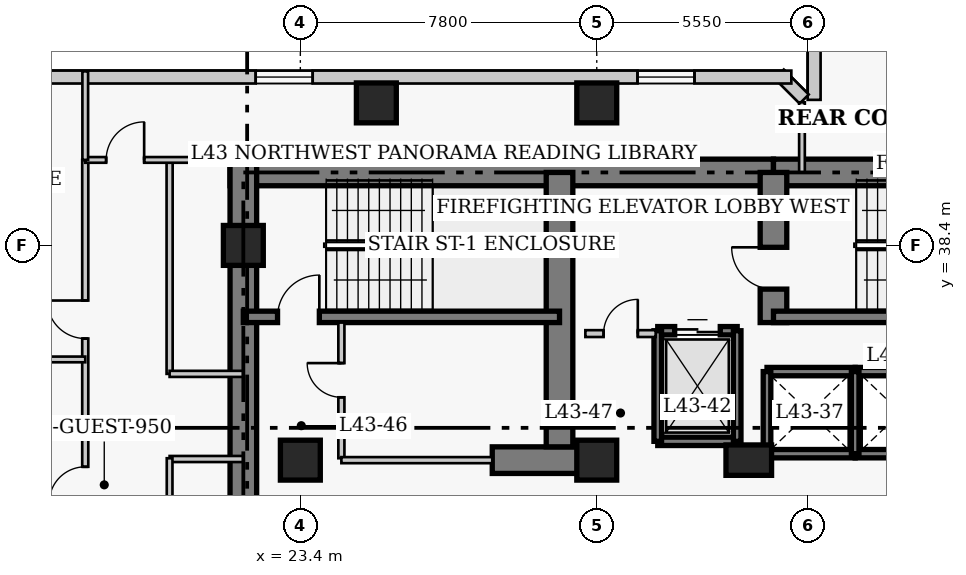
"""IFC4 building model, lengths in metres.
Left out: names, types, materials, properties, quantities, classifications, styles, units other than length and angle.
Written with IfcOpenShell. Run it as: python <this file> out.ifc"""

import sys

from ifc_helpers import new_model, si_unit, direction, frame, frame_2d, origin, origin_2d, place, context, subcontext, project, spatial, rectangle, extrude, element, fill, save


model = new_model("IFC4")
c1 = context("Model", 3, precision=1e-05, world=origin(), true_north=direction((0.0, 1.0)))
c2 = subcontext(c1, "Body", "Model", "MODEL_VIEW")
j1 = project(units=[si_unit("LENGTHUNIT", "METRE"), si_unit("PLANEANGLEUNIT", "RADIAN")], contexts=[c1])
p1 = place(None, origin())
s1 = spatial("IfcSite", under=j1, at=p1, CompositionType="ELEMENT")
p2 = place(p1, origin())
s2 = spatial("IfcBuilding", under=s1, at=p2, CompositionType="ELEMENT")
p3 = place(p2, frame((0.0, 0.0, 172.6)))
s3 = spatial("IfcBuildingStorey", under=s2, at=p3, CompositionType="ELEMENT", Elevation=172.6)
p4 = place(p3, frame((21.55, 40.32, 0.0), z_axis=(0.0, 0.0, 1.0), x_axis=(1.0, 0.0, 0.0)))
e1 = element("IfcWall", 1, at=p4, inside=s3, PredefinedType="SHEAR", context=c2, shape_type="SweptSolid", body=[
    extrude(rectangle(XDim=14.3, YDim=0.7, at=frame_2d((7.15, 0.0))), origin(), (0.0, 0.0, 1.0), 3.8),
])
p5 = place(p3, frame((35.85, 40.32, 0.0), z_axis=(0.0, 0.0, 1.0), x_axis=(1.0, 0.0, 0.0)))
e2 = element("IfcWall", 2, at=p5, inside=s3, PredefinedType="SHEAR", context=c2, shape_type="SweptSolid", body=[
    extrude(rectangle(XDim=12.6, YDim=0.7, at=frame_2d((6.3, 0.0))), origin(), (0.0, 0.0, 1.0), 3.8),
])
p6 = place(p3, frame((21.9, 27.05, 0.0), z_axis=(0.0, 0.0, 1.0), x_axis=(0.0, 1.0, 0.0)))
e3 = element("IfcWall", 3, at=p6, inside=s3, PredefinedType="SHEAR", context=c2, shape_type="SweptSolid", body=[
    extrude(rectangle(XDim=13.62, YDim=0.7, at=frame_2d((6.81, 0.0))), origin(), (0.0, 0.0, 1.0), 3.8),
])
p7 = place(p3, frame((28.45, 32.75, 0.0), z_axis=(0.0, 0.0, 1.0), x_axis=(1.0, 0.0, 0.0)))
e4 = element("IfcWall", 4, at=p7, inside=s3, PredefinedType="SHEAR", context=c2, shape_type="SweptSolid", body=[
    extrude(rectangle(XDim=2.4, YDim=0.7, at=frame_2d((1.2, 0.0))), origin(), (0.0, 0.0, 1.0), 3.8),
])
p8 = place(p3, frame((30.22, 33.1, 0.0), z_axis=(0.0, 0.0, 1.0), x_axis=(0.0, 1.0, 0.0)))
e5 = element("IfcWall", 5, at=p8, inside=s3, PredefinedType="SHEAR", context=c2, shape_type="SweptSolid", body=[
    extrude(rectangle(XDim=7.22, YDim=0.7, at=frame_2d((3.61, 0.0))), origin(), (0.0, 0.0, 1.0), 3.8),
])
p9 = place(p3, frame((35.85, 36.37, 0.0), z_axis=(0.0, 0.0, 1.0), x_axis=(0.0, 1.0, 0.0)))
e6 = element("IfcWall", 6, at=p9, inside=s3, PredefinedType="SHEAR", context=c2, shape_type="SweptSolid", body=[
    extrude(rectangle(XDim=3.95, YDim=0.7, at=frame_2d((1.975, 0.0))), origin(), (0.0, 0.0, 1.0), 3.8),
])
p10 = place(p9, frame((0.88, 0.0, 0.0)))
e7 = element("IfcOpeningElement", 7, at=p10, cuts=e6, PredefinedType="OPENING", context=c2, shape_type="SweptSolid", body=[
    extrude(rectangle(XDim=1.1, YDim=2.15, at=frame_2d((0.55, 1.075))), frame((0.0, 0.36, 0.0), z_axis=(0.0, -1.0, 0.0), x_axis=(1.0, 0.0, 0.0)), (0.0, 0.0, 1.0), 0.72),
])
p11 = place(p3, frame((21.9, 36.52, 0.0), z_axis=(0.0, 0.0, 1.0), x_axis=(1.0, 0.0, 0.0)))
e8 = element("IfcWall", 8, at=p11, inside=s3, PredefinedType="SHEAR", context=c2, shape_type="SweptSolid", body=[
    extrude(rectangle(XDim=8.32, YDim=0.3, at=frame_2d((4.16, 0.0))), origin(), (0.0, 0.0, 1.0), 3.8),
])
p12 = place(p11, frame((0.9, 0.0, 0.0)))
e9 = element("IfcOpeningElement", 9, at=p12, cuts=e8, PredefinedType="OPENING", context=c2, shape_type="SweptSolid", body=[
    extrude(rectangle(XDim=1.1, YDim=2.15, at=frame_2d((0.55, 1.075))), frame((0.0, 0.16, 0.0), z_axis=(0.0, -1.0, 0.0), x_axis=(1.0, 0.0, 0.0)), (0.0, 0.0, 1.0), 0.32),
])
p13 = place(p3, frame((35.85, 36.52, 0.0), z_axis=(0.0, 0.0, 1.0), x_axis=(1.0, 0.0, 0.0)))
e10 = element("IfcWall", 10, at=p13, inside=s3, PredefinedType="SHEAR", context=c2, shape_type="SweptSolid", body=[
    extrude(rectangle(XDim=8.33, YDim=0.3, at=frame_2d((4.165, 0.0))), origin(), (0.0, 0.0, 1.0), 3.8),
])
for number, where, z_axis, x_axis in (
    (11, (21.9, 38.4, 0.0), (0.0, 0.0, 1.0), (1.0, 0.0, 0.0)),
    (12, (23.4, 32.75, 0.0), (0.0, 0.0, 1.0), (1.0, 0.0, 0.0)),
    (13, (31.2, 32.75, 0.0), (0.0, 0.0, 1.0), (1.0, 0.0, 0.0)),
):
    element("IfcColumn", number, at=place(p3, frame(where, z_axis=z_axis, x_axis=x_axis)), inside=s3, PredefinedType="COLUMN", context=c2, shape_type="SweptSolid", body=[
        extrude(rectangle(XDim=1.05, YDim=1.05, at=origin_2d()), origin(), (0.0, 0.0, 1.0), 3.8),
    ])
p14 = place(p3, frame((35.2, 32.75, 0.0), z_axis=(0.0, 0.0, 1.0), x_axis=(1.0, 0.0, 0.0)))
e14 = element("IfcColumn", 14, at=p14, inside=s3, PredefinedType="COLUMN", context=c2, shape_type="SweptSolid", body=[
    extrude(rectangle(XDim=1.2, YDim=0.8, at=origin_2d()), origin(), (0.0, 0.0, 1.0), 3.8),
])
for number, where, z_axis, x_axis in (
    (15, (25.4, 42.15, 0.0), (0.0, 0.0, 1.0), (1.0, 0.0, 0.0)),
    (16, (31.2, 42.15, 0.0), (0.0, 0.0, 1.0), (1.0, 0.0, 0.0)),
):
    element("IfcColumn", number, at=place(p3, frame(where, z_axis=z_axis, x_axis=x_axis)), inside=s3, PredefinedType="COLUMN", context=c2, shape_type="SweptSolid", body=[
        extrude(rectangle(XDim=1.05, YDim=1.05, at=origin_2d()), origin(), (0.0, 0.0, 1.0), 3.8),
    ])
p15 = place(p3, frame((36.92, 44.37, 0.0), z_axis=(0.0, 0.0, 1.0), x_axis=(0.0, -1.0, 0.0)))
e17 = element("IfcWall", 17, at=p15, inside=s3, PredefinedType="SOLIDWALL", context=c2, shape_type="SweptSolid", body=[
    extrude(rectangle(XDim=2.14, YDim=0.34, at=frame_2d((1.07, 0.0))), origin(), (0.0, 0.0, 1.0), 3.55),
])
p16 = place(p3, frame((36.658, 42.251, 0.0), z_axis=(0.0, 0.0, 1.0), x_axis=(-0.707106781187, 0.707106781187, 0.0)))
e18 = element("IfcWall", 18, at=p16, inside=s3, PredefinedType="SOLIDWALL", context=c2, shape_type="SweptSolid", body=[
    extrude(rectangle(XDim=0.929, YDim=0.34, at=frame_2d((0.464, 0.0))), origin(), (0.0, 0.0, 1.0), 3.55),
])
p17 = place(p3, frame((36.32, 42.83, 0.0), z_axis=(0.0, 0.0, 1.0), x_axis=(-1.0, 0.0, 0.0)))
e19 = element("IfcWall", 19, at=p17, inside=s3, PredefinedType="SOLIDWALL", context=c2, shape_type="SweptSolid", body=[
    extrude(rectangle(XDim=26.69, YDim=0.34, at=frame_2d((13.345, 0.0))), origin(), (0.0, 0.0, 1.0), 3.55),
])
p18 = place(p17, frame((2.548, 0.0, 0.85)))
e20 = element("IfcOpeningElement", 20, at=p18, cuts=e19, PredefinedType="OPENING", context=c2, shape_type="SweptSolid", body=[
    extrude(rectangle(XDim=1.5, YDim=1.75, at=frame_2d((0.75, 0.875))), frame((0.0, 0.18, 0.0), z_axis=(0.0, -1.0, 0.0), x_axis=(1.0, 0.0, 0.0)), (0.0, 0.0, 1.0), 0.36),
])
p19 = place(p17, frame((12.595, 0.0, 0.85)))
e21 = element("IfcOpeningElement", 21, at=p19, cuts=e19, PredefinedType="OPENING", context=c2, shape_type="SweptSolid", body=[
    extrude(rectangle(XDim=1.5, YDim=1.75, at=frame_2d((0.75, 0.875))), frame((0.0, 0.18, 0.0), z_axis=(0.0, -1.0, 0.0), x_axis=(1.0, 0.0, 0.0)), (0.0, 0.0, 1.0), 0.36),
])
p20 = place(p17, frame((21.492, 0.0, 0.85)))
e22 = element("IfcOpeningElement", 22, at=p20, cuts=e19, PredefinedType="OPENING", context=c2, shape_type="SweptSolid", body=[
    extrude(rectangle(XDim=1.5, YDim=1.75, at=frame_2d((0.75, 0.875))), frame((0.0, 0.18, 0.0), z_axis=(0.0, -1.0, 0.0), x_axis=(1.0, 0.0, 0.0)), (0.0, 0.0, 1.0), 0.36),
])
for number, where, z_axis, x_axis in (
    (23, (35.68, 35.08, 0.0), (0.0, 0.0, 1.0), (1.0, 0.0, 0.0)),
    (24, (35.68, 32.92, 0.0), (0.0, 0.0, 1.0), (1.0, 0.0, 0.0)),
):
    element("IfcWall", number, at=place(p3, frame(where, z_axis=z_axis, x_axis=x_axis)), inside=s3, PredefinedType="SHEAR", context=c2, shape_type="SweptSolid", body=[
        extrude(rectangle(XDim=2.32, YDim=0.22, at=frame_2d((1.16, 0.0))), origin(), (0.0, 0.0, 1.0), 3.8),
    ])
p21 = place(p3, frame((35.68, 32.92, 0.0), z_axis=(0.0, 0.0, 1.0), x_axis=(0.0, 1.0, 0.0)))
e25 = element("IfcWall", 25, at=p21, inside=s3, PredefinedType="SHEAR", context=c2, shape_type="SweptSolid", body=[
    extrude(rectangle(XDim=2.16, YDim=0.2, at=frame_2d((1.08, 0.0))), origin(), (0.0, 0.0, 1.0), 3.8),
])
for number, where, z_axis, x_axis in (
    (26, (38.0, 35.08, 0.0), (0.0, 0.0, 1.0), (1.0, 0.0, 0.0)),
    (27, (38.0, 32.92, 0.0), (0.0, 0.0, 1.0), (1.0, 0.0, 0.0)),
):
    element("IfcWall", number, at=place(p3, frame(where, z_axis=z_axis, x_axis=x_axis)), inside=s3, PredefinedType="SHEAR", context=c2, shape_type="SweptSolid", body=[
        extrude(rectangle(XDim=2.4, YDim=0.22, at=frame_2d((1.2, 0.0))), origin(), (0.0, 0.0, 1.0), 3.8),
    ])
p22 = place(p3, frame((38.0, 32.92, 0.0), z_axis=(0.0, 0.0, 1.0), x_axis=(0.0, 1.0, 0.0)))
e28 = element("IfcWall", 28, at=p22, inside=s3, PredefinedType="SHEAR", context=c2, shape_type="SweptSolid", body=[
    extrude(rectangle(XDim=2.16, YDim=0.2, at=frame_2d((1.08, 0.0))), origin(), (0.0, 0.0, 1.0), 3.8),
])
p23 = place(p3, frame((32.805, 36.155, 0.0), z_axis=(0.0, 0.0, 1.0), x_axis=(1.0, 0.0, 0.0)))
e29 = element("IfcWall", 29, at=p23, inside=s3, PredefinedType="SHEAR", context=c2, shape_type="SweptSolid", body=[
    extrude(rectangle(XDim=2.09, YDim=0.22, at=frame_2d((1.045, 0.0))), origin(), (0.0, 0.0, 1.0), 3.8),
])
p24 = place(p23, frame((0.445, 0.0, 0.0)))
e30 = element("IfcOpeningElement", 30, at=p24, cuts=e29, PredefinedType="OPENING", context=c2, shape_type="SweptSolid", body=[
    extrude(rectangle(XDim=1.2, YDim=2.15, at=frame_2d((0.6, 1.075))), frame((0.0, 0.12, 0.0), z_axis=(0.0, -1.0, 0.0), x_axis=(1.0, 0.0, 0.0)), (0.0, 0.0, 1.0), 0.24),
])
p25 = place(p3, frame((32.805, 33.245, 0.0), z_axis=(0.0, 0.0, 1.0), x_axis=(1.0, 0.0, 0.0)))
e31 = element("IfcWall", 31, at=p25, inside=s3, PredefinedType="SHEAR", context=c2, shape_type="SweptSolid", body=[
    extrude(rectangle(XDim=2.09, YDim=0.22, at=frame_2d((1.045, 0.0))), origin(), (0.0, 0.0, 1.0), 3.8),
])
for number, where, z_axis, x_axis in (
    (32, (32.805, 33.245, 0.0), (0.0, 0.0, 1.0), (0.0, 1.0, 0.0)),
    (33, (34.895, 33.245, 0.0), (0.0, 0.0, 1.0), (0.0, 1.0, 0.0)),
):
    element("IfcWall", number, at=place(p3, frame(where, z_axis=z_axis, x_axis=x_axis)), inside=s3, PredefinedType="SHEAR", context=c2, shape_type="SweptSolid", body=[
        extrude(rectangle(XDim=2.91, YDim=0.2, at=frame_2d((1.455, 0.0))), origin(), (0.0, 0.0, 1.0), 3.8),
    ])
p26 = place(p3, frame((30.9, 36.08, 0.0), z_axis=(0.0, 0.0, 1.0), x_axis=(1.0, 0.0, 0.0)))
e34 = element("IfcWall", 34, at=p26, inside=s3, PredefinedType="PARTITIONING", context=c2, shape_type="SweptSolid", body=[
    extrude(rectangle(XDim=1.85, YDim=0.18, at=frame_2d((0.925, 0.0))), origin(), (0.0, 0.0, 1.0), 3.55),
])
p27 = place(p26, frame((0.48, 0.0, 0.0)))
e35 = element("IfcOpeningElement", 35, at=p27, cuts=e34, PredefinedType="OPENING", context=c2, shape_type="SweptSolid", body=[
    extrude(rectangle(XDim=0.9, YDim=2.15, at=frame_2d((0.45, 1.075))), frame((0.0, 0.1, 0.0), z_axis=(0.0, -1.0, 0.0), x_axis=(1.0, 0.0, 0.0)), (0.0, 0.0, 1.0), 0.2),
])
p28 = place(p3, frame((24.48, 32.8, 0.0), z_axis=(0.0, 0.0, 1.0), x_axis=(0.0, 1.0, 0.0)))
e36 = element("IfcWall", 36, at=p28, inside=s3, PredefinedType="PARTITIONING", context=c2, shape_type="SweptSolid", body=[
    extrude(rectangle(XDim=3.57, YDim=0.16, at=frame_2d((1.785, 0.0))), origin(), (0.0, 0.0, 1.0), 3.55),
])
p29 = place(p28, frame((1.604, 0.0, 0.0)))
e37 = element("IfcOpeningElement", 37, at=p29, cuts=e36, PredefinedType="OPENING", context=c2, shape_type="SweptSolid", body=[
    extrude(rectangle(XDim=0.9, YDim=2.1, at=frame_2d((0.45, 1.05))), frame((0.0, 0.09, 0.0), z_axis=(0.0, -1.0, 0.0), x_axis=(1.0, 0.0, 0.0)), (0.0, 0.0, 1.0), 0.18),
])
p30 = place(p3, frame((24.48, 32.75, 0.0), z_axis=(0.0, 0.0, 1.0), x_axis=(1.0, 0.0, 0.0)))
e38 = element("IfcWall", 38, at=p30, inside=s3, PredefinedType="PARTITIONING", context=c2, shape_type="SweptSolid", body=[
    extrude(rectangle(XDim=3.97, YDim=0.16, at=frame_2d((1.985, 0.0))), origin(), (0.0, 0.0, 1.0), 3.55),
])
p31 = place(p3, frame((17.74, 6.85, 0.0), z_axis=(0.0, 0.0, 1.0), x_axis=(0.0, 1.0, 0.0)))
e39 = element("IfcWall", 39, at=p31, inside=s3, PredefinedType="PARTITIONING", context=c2, shape_type="SweptSolid", body=[
    extrude(rectangle(XDim=33.8, YDim=0.16, at=frame_2d((16.9, 0.0))), origin(), (0.0, 0.0, 1.0), 3.55),
])
p32 = place(p31, frame((1.7, 0.0, 0.0)))
e40 = element("IfcOpeningElement", 40, at=p32, cuts=e39, PredefinedType="OPENING", context=c2, shape_type="SweptSolid", body=[
    extrude(rectangle(XDim=0.95, YDim=2.1, at=frame_2d((0.475, 1.05))), frame((0.0, 0.09, 0.0), z_axis=(0.0, -1.0, 0.0), x_axis=(1.0, 0.0, 0.0)), (0.0, 0.0, 1.0), 0.18),
])
p33 = place(p31, frame((8.275, 0.0, 0.0)))
e41 = element("IfcOpeningElement", 41, at=p33, cuts=e39, PredefinedType="OPENING", context=c2, shape_type="SweptSolid", body=[
    extrude(rectangle(XDim=0.95, YDim=2.1, at=frame_2d((0.475, 1.05))), frame((0.0, 0.09, 0.0), z_axis=(0.0, -1.0, 0.0), x_axis=(1.0, 0.0, 0.0)), (0.0, 0.0, 1.0), 0.18),
])
p34 = place(p31, frame((17.075, 0.0, 0.0)))
e42 = element("IfcOpeningElement", 42, at=p34, cuts=e39, PredefinedType="OPENING", context=c2, shape_type="SweptSolid", body=[
    extrude(rectangle(XDim=0.95, YDim=2.1, at=frame_2d((0.475, 1.05))), frame((0.0, 0.09, 0.0), z_axis=(0.0, -1.0, 0.0), x_axis=(1.0, 0.0, 0.0)), (0.0, 0.0, 1.0), 0.18),
])
p35 = place(p31, frame((24.775, 0.0, 0.0)))
e43 = element("IfcOpeningElement", 43, at=p35, cuts=e39, PredefinedType="OPENING", context=c2, shape_type="SweptSolid", body=[
    extrude(rectangle(XDim=0.95, YDim=2.1, at=frame_2d((0.475, 1.05))), frame((0.0, 0.09, 0.0), z_axis=(0.0, -1.0, 0.0), x_axis=(1.0, 0.0, 0.0)), (0.0, 0.0, 1.0), 0.18),
])
p36 = place(p31, frame((29.1, 0.0, 0.0)))
e44 = element("IfcOpeningElement", 44, at=p36, cuts=e39, PredefinedType="OPENING", context=c2, shape_type="SweptSolid", body=[
    extrude(rectangle(XDim=1.0, YDim=2.15, at=frame_2d((0.5, 1.075))), frame((0.0, 0.09, 0.0), z_axis=(0.0, -1.0, 0.0), x_axis=(1.0, 0.0, 0.0)), (0.0, 0.0, 1.0), 0.18),
])
p37 = place(p3, frame((19.96, 35.02, 0.0), z_axis=(0.0, 0.0, 1.0), x_axis=(0.0, 1.0, 0.0)))
e45 = element("IfcWall", 45, at=p37, inside=s3, PredefinedType="PARTITIONING", context=c2, shape_type="SweptSolid", body=[
    extrude(rectangle(XDim=5.63, YDim=0.16, at=frame_2d((2.815, 0.0))), origin(), (0.0, 0.0, 1.0), 3.55),
])
for number, where, z_axis, x_axis in (
    (46, (19.96, 35.02, 0.0), (0.0, 0.0, 1.0), (1.0, 0.0, 0.0)),
    (47, (19.96, 32.78, 0.0), (0.0, 0.0, 1.0), (1.0, 0.0, 0.0)),
):
    element("IfcWall", number, at=place(p3, frame(where, z_axis=z_axis, x_axis=x_axis)), inside=s3, PredefinedType="PARTITIONING", context=c2, shape_type="SweptSolid", body=[
        extrude(rectangle(XDim=1.94, YDim=0.16, at=frame_2d((0.97, 0.0))), origin(), (0.0, 0.0, 1.0), 3.55),
    ])
p38 = place(p3, frame((17.74, 40.65, 0.0), z_axis=(0.0, 0.0, 1.0), x_axis=(1.0, 0.0, 0.0)))
e48 = element("IfcWall", 48, at=p38, inside=s3, PredefinedType="PARTITIONING", context=c2, shape_type="SweptSolid", body=[
    extrude(rectangle(XDim=4.36, YDim=0.15, at=frame_2d((2.18, 0.0))), origin(), (0.0, 0.0, 1.0), 3.55),
])
p39 = place(p38, frame((0.55, 0.0, 0.0)))
e49 = element("IfcOpeningElement", 49, at=p39, cuts=e48, PredefinedType="OPENING", context=c2, shape_type="SweptSolid", body=[
    extrude(rectangle(XDim=1.0, YDim=2.15, at=frame_2d((0.5, 1.075))), frame((0.0, 0.085, 0.0), z_axis=(0.0, -1.0, 0.0), x_axis=(1.0, 0.0, 0.0)), (0.0, 0.0, 1.0), 0.17),
])
p40 = place(p3, frame((19.96, 19.16, 0.0), z_axis=(0.0, 0.0, 1.0), x_axis=(0.0, 1.0, 0.0)))
e50 = element("IfcWall", 50, at=p40, inside=s3, PredefinedType="PARTITIONING", context=c2, shape_type="SweptSolid", body=[
    extrude(rectangle(XDim=13.64, YDim=0.15, at=frame_2d((6.82, 0.0))), origin(), (0.0, 0.0, 1.0), 3.55),
])
p41 = place(p3, frame((17.74, 40.65, 0.0), z_axis=(0.0, 0.0, 1.0), x_axis=(0.0, 1.0, 0.0)))
e51 = element("IfcWall", 51, at=p41, inside=s3, PredefinedType="PARTITIONING", context=c2, shape_type="SweptSolid", body=[
    extrude(rectangle(XDim=2.33, YDim=0.15, at=frame_2d((1.165, 0.0))), origin(), (0.0, 0.0, 1.0), 3.55),
])
p42 = place(p3, frame((36.6, 40.32, 0.0), z_axis=(0.0, 0.0, 1.0), x_axis=(0.0, 1.0, 0.0)))
e52 = element("IfcWall", 52, at=p42, inside=s3, PredefinedType="PARTITIONING", context=c2, shape_type="SweptSolid", body=[
    extrude(rectangle(XDim=1.845, YDim=0.15, at=frame_2d((0.922, 0.0))), origin(), (0.0, 0.0, 1.0), 3.55),
])
p43 = place(p3, frame((14.45, 35.4, 0.0), z_axis=(0.0, 0.0, 1.0), x_axis=(1.0, 0.0, 0.0)))
e53 = element("IfcWall", 53, at=p43, inside=s3, PredefinedType="PARTITIONING", context=c2, shape_type="SweptSolid", body=[
    extrude(rectangle(XDim=3.29, YDim=0.15, at=frame_2d((1.645, 0.0))), origin(), (0.0, 0.0, 1.0), 3.55),
])
p44 = place(p18, origin())
e54 = element("IfcWindow", 54, at=p44, inside=s3, PartitioningType="SINGLE_PANEL", PredefinedType="WINDOW", context=c2, shape_type="SweptSolid", body=[
    extrude(rectangle(XDim=1.5, YDim=1.75, at=frame_2d((0.75, 0.875))), frame((0.0, 0.03, 0.0), z_axis=(0.0, -1.0, 0.0), x_axis=(1.0, 0.0, 0.0)), (0.0, 0.0, 1.0), 0.06),
])
fill(e20, e54)
p45 = place(p19, origin())
e55 = element("IfcWindow", 55, at=p45, inside=s3, PartitioningType="SINGLE_PANEL", PredefinedType="WINDOW", context=c2, shape_type="SweptSolid", body=[
    extrude(rectangle(XDim=1.5, YDim=1.75, at=frame_2d((0.75, 0.875))), frame((0.0, 0.03, 0.0), z_axis=(0.0, -1.0, 0.0), x_axis=(1.0, 0.0, 0.0)), (0.0, 0.0, 1.0), 0.06),
])
fill(e21, e55)
p46 = place(p24, origin())
e56 = element("IfcDoor", 56, at=p46, inside=s3, OperationType="DOUBLE_DOOR_SLIDING", PredefinedType="DOOR", context=c2, shape_type="SweptSolid", body=[
    extrude(rectangle(XDim=1.2, YDim=2.15, at=frame_2d((0.6, 1.075))), frame((0.0, 0.025, 0.0), z_axis=(0.0, -1.0, 0.0), x_axis=(1.0, 0.0, 0.0)), (0.0, 0.0, 1.0), 0.05),
])
fill(e30, e56)
p47 = place(p27, origin())
e57 = element("IfcDoor", 57, at=p47, inside=s3, OperationType="SINGLE_SWING_RIGHT", PredefinedType="DOOR", context=c2, shape_type="SweptSolid", body=[
    extrude(rectangle(XDim=0.9, YDim=2.15, at=frame_2d((0.45, 1.075))), frame((0.0, 0.025, 0.0), z_axis=(0.0, -1.0, 0.0), x_axis=(1.0, 0.0, 0.0)), (0.0, 0.0, 1.0), 0.05),
])
fill(e35, e57)
p48 = place(p29, origin())
e58 = element("IfcDoor", 58, at=p48, inside=s3, OperationType="SINGLE_SWING_RIGHT", PredefinedType="DOOR", context=c2, shape_type="SweptSolid", body=[
    extrude(rectangle(XDim=0.9, YDim=2.1, at=frame_2d((0.45, 1.05))), frame((0.0, 0.025, 0.0), z_axis=(0.0, -1.0, 0.0), x_axis=(1.0, 0.0, 0.0)), (0.0, 0.0, 1.0), 0.05),
])
fill(e37, e58)
p49 = place(p39, origin())
e59 = element("IfcDoor", 59, at=p49, inside=s3, OperationType="SINGLE_SWING_RIGHT", PredefinedType="DOOR", context=c2, shape_type="SweptSolid", body=[
    extrude(rectangle(XDim=1.0, YDim=2.15, at=frame_2d((0.5, 1.075))), frame((0.0, 0.025, 0.0), z_axis=(0.0, -1.0, 0.0), x_axis=(1.0, 0.0, 0.0)), (0.0, 0.0, 1.0), 0.05),
])
fill(e49, e59)
p50 = place(p35, origin())
e60 = element("IfcDoor", 60, at=p50, inside=s3, OperationType="SINGLE_SWING_LEFT", PredefinedType="DOOR", context=c2, shape_type="SweptSolid", body=[
    extrude(rectangle(XDim=0.95, YDim=2.1, at=frame_2d((0.475, 1.05))), frame((0.0, 0.025, 0.0), z_axis=(0.0, -1.0, 0.0), x_axis=(1.0, 0.0, 0.0)), (0.0, 0.0, 1.0), 0.05),
])
fill(e43, e60)
p51 = place(p36, origin())
e61 = element("IfcDoor", 61, at=p51, inside=s3, OperationType="SINGLE_SWING_RIGHT", PredefinedType="DOOR", context=c2, shape_type="SweptSolid", body=[
    extrude(rectangle(XDim=1.0, YDim=2.15, at=frame_2d((0.5, 1.075))), frame((0.0, 0.025, 0.0), z_axis=(0.0, -1.0, 0.0), x_axis=(1.0, 0.0, 0.0)), (0.0, 0.0, 1.0), 0.05),
])
fill(e44, e61)
p52 = place(p12, origin())
e62 = element("IfcDoor", 62, at=p52, inside=s3, OperationType="SINGLE_SWING_RIGHT", PredefinedType="DOOR", context=c2, shape_type="SweptSolid", body=[
    extrude(rectangle(XDim=1.1, YDim=2.15, at=frame_2d((0.55, 1.075))), frame((0.0, 0.025, 0.0), z_axis=(0.0, -1.0, 0.0), x_axis=(1.0, 0.0, 0.0)), (0.0, 0.0, 1.0), 0.05),
])
fill(e9, e62)
p53 = place(p10, origin())
e63 = element("IfcDoor", 63, at=p53, inside=s3, OperationType="SINGLE_SWING_RIGHT", PredefinedType="DOOR", context=c2, shape_type="SweptSolid", body=[
    extrude(rectangle(XDim=1.1, YDim=2.15, at=frame_2d((0.55, 1.075))), frame((0.0, 0.025, 0.0), z_axis=(0.0, -1.0, 0.0), x_axis=(1.0, 0.0, 0.0)), (0.0, 0.0, 1.0), 0.05),
])
fill(e7, e63)
save(model, sys.argv[1])
